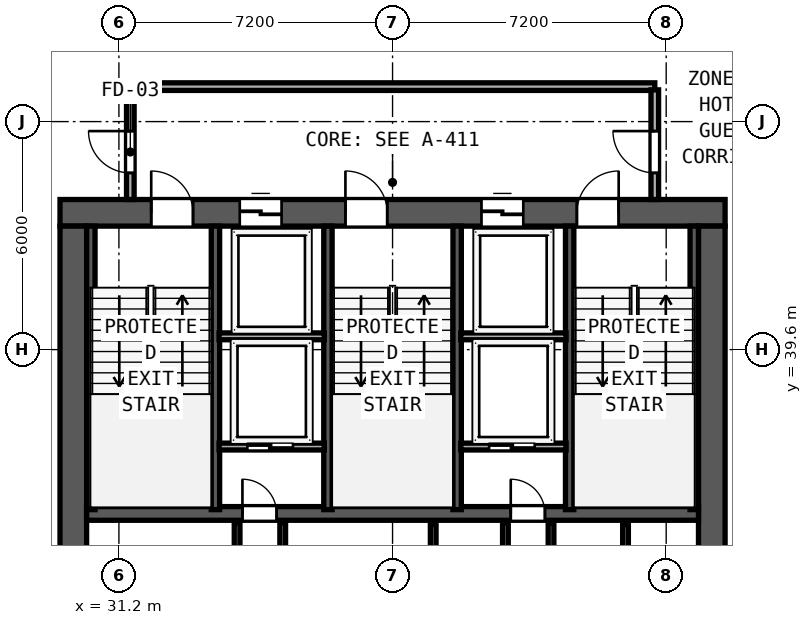
"""IFC4 building model, lengths in metres.
Left out: names, types, materials, properties, quantities, classifications, styles, units other than length and angle.
Written with IfcOpenShell. Run it as: python <this file> out.ifc"""

import sys

from ifc_helpers import new_model, si_unit, direction, frame, frame_2d, origin, place, context, subcontext, project, spatial, rectangle, extrude, element, fill, save


model = new_model("IFC4")
c1 = context("Model", 3, precision=1e-05, world=origin(), true_north=direction((0.0, 1.0)))
c2 = subcontext(c1, "Body", "Model", "MODEL_VIEW")
j1 = project(units=[si_unit("LENGTHUNIT", "METRE"), si_unit("PLANEANGLEUNIT", "RADIAN")], contexts=[c1])
p1 = place(None, origin())
s1 = spatial("IfcSite", under=j1, at=p1, CompositionType="ELEMENT")
p2 = place(p1, origin())
s2 = spatial("IfcBuilding", under=s1, at=p2, CompositionType="ELEMENT")
p3 = place(p2, frame((0.0, 0.0, 106.0)))
s3 = spatial("IfcBuildingStorey", under=s2, at=p3, CompositionType="ELEMENT", Elevation=106.0)
p4 = place(p3, frame((29.65, 43.2, 0.0), z_axis=(0.0, 0.0, 1.0), x_axis=(1.0, 0.0, 0.0)))
e1 = element("IfcWall", 1, at=p4, inside=s3, PredefinedType="SHEAR", context=c2, shape_type="SweptSolid", body=[
    extrude(rectangle(XDim=17.5, YDim=0.7, at=frame_2d((8.75, 0.0))), origin(), (0.0, 0.0, 1.0), 3.6),
])
p5 = place(p4, frame((2.4, 0.0, 0.0)))
e2 = element("IfcOpeningElement", 2, at=p5, cuts=e1, PredefinedType="OPENING", context=c2, shape_type="SweptSolid", body=[
    extrude(rectangle(XDim=1.1, YDim=2.15, at=frame_2d((0.55, 1.075))), frame((0.0, 0.36, 0.0), z_axis=(0.0, -1.0, 0.0), x_axis=(1.0, 0.0, 0.0)), (0.0, 0.0, 1.0), 0.72),
])
p6 = place(p4, frame((7.51, 0.0, 0.0)))
e3 = element("IfcOpeningElement", 3, at=p6, cuts=e1, PredefinedType="OPENING", context=c2, shape_type="SweptSolid", body=[
    extrude(rectangle(XDim=1.1, YDim=2.15, at=frame_2d((0.55, 1.075))), frame((0.0, 0.36, 0.0), z_axis=(0.0, -1.0, 0.0), x_axis=(1.0, 0.0, 0.0)), (0.0, 0.0, 1.0), 0.72),
])
p7 = place(p4, frame((13.6, 0.0, 0.0)))
e4 = element("IfcOpeningElement", 4, at=p7, cuts=e1, PredefinedType="OPENING", context=c2, shape_type="SweptSolid", body=[
    extrude(rectangle(XDim=1.1, YDim=2.15, at=frame_2d((0.55, 1.075))), frame((0.0, 0.36, 0.0), z_axis=(0.0, -1.0, 0.0), x_axis=(1.0, 0.0, 0.0)), (0.0, 0.0, 1.0), 0.72),
])
p8 = place(p4, frame((4.73, 0.0, 0.0)))
e5 = element("IfcOpeningElement", 5, at=p8, cuts=e1, PredefinedType="OPENING", context=c2, shape_type="SweptSolid", body=[
    extrude(rectangle(XDim=1.1, YDim=2.2, at=frame_2d((0.55, 1.1))), frame((0.0, 0.36, 0.0), z_axis=(0.0, -1.0, 0.0), x_axis=(1.0, 0.0, 0.0)), (0.0, 0.0, 1.0), 0.72),
])
p9 = place(p4, frame((11.09, 0.0, 0.0)))
e6 = element("IfcOpeningElement", 6, at=p9, cuts=e1, PredefinedType="OPENING", context=c2, shape_type="SweptSolid", body=[
    extrude(rectangle(XDim=1.1, YDim=2.2, at=frame_2d((0.55, 1.1))), frame((0.0, 0.36, 0.0), z_axis=(0.0, -1.0, 0.0), x_axis=(1.0, 0.0, 0.0)), (0.0, 0.0, 1.0), 0.72),
])
for number, where, z_axis, x_axis in (
    (7, (30.0, 32.8, 0.0), (0.0, 0.0, 1.0), (0.0, 1.0, 0.0)),
    (8, (46.8, 32.8, 0.0), (0.0, 0.0, 1.0), (0.0, 1.0, 0.0)),
):
    element("IfcWall", number, at=place(p3, frame(where, z_axis=z_axis, x_axis=x_axis)), inside=s3, PredefinedType="SHEAR", context=c2, shape_type="SweptSolid", body=[
        extrude(rectangle(XDim=10.05, YDim=0.7, at=frame_2d((5.025, 0.0))), origin(), (0.0, 0.0, 1.0), 3.6),
    ])
p10 = place(p3, frame((30.35, 35.29, 0.0), z_axis=(0.0, 0.0, 1.0), x_axis=(1.0, 0.0, 0.0)))
e9 = element("IfcWall", 9, at=p10, inside=s3, PredefinedType="SHEAR", context=c2, shape_type="SweptSolid", body=[
    extrude(rectangle(XDim=16.1, YDim=0.36, at=frame_2d((8.05, 0.0))), origin(), (0.0, 0.0, 1.0), 3.6),
])
p11 = place(p10, frame((5.0, 0.0, 0.0), z_axis=(0.0, 0.0, 1.0), x_axis=(-1.0, 0.0, 0.0)))
e10 = element("IfcOpeningElement", 10, at=p11, cuts=e9, PredefinedType="OPENING", context=c2, shape_type="SweptSolid", body=[
    extrude(rectangle(XDim=0.9, YDim=2.1, at=frame_2d((0.45, 1.05))), frame((0.0, 0.19, 0.0), z_axis=(0.0, -1.0, 0.0), x_axis=(1.0, 0.0, 0.0)), (0.0, 0.0, 1.0), 0.38),
])
p12 = place(p10, frame((12.06, 0.0, 0.0), z_axis=(0.0, 0.0, 1.0), x_axis=(-1.0, 0.0, 0.0)))
e11 = element("IfcOpeningElement", 11, at=p12, cuts=e9, PredefinedType="OPENING", context=c2, shape_type="SweptSolid", body=[
    extrude(rectangle(XDim=0.9, YDim=2.1, at=frame_2d((0.45, 1.05))), frame((0.0, 0.19, 0.0), z_axis=(0.0, -1.0, 0.0), x_axis=(1.0, 0.0, 0.0)), (0.0, 0.0, 1.0), 0.38),
])
for number, where, z_axis, x_axis in (
    (12, (30.462, 35.39, 0.0), (0.0, 0.0, 1.0), (0.0, 1.0, 0.0)),
    (13, (33.74, 35.39, 0.0), (0.0, 0.0, 1.0), (0.0, 1.0, 0.0)),
    (14, (36.7, 35.39, 0.0), (0.0, 0.0, 1.0), (0.0, 1.0, 0.0)),
    (15, (40.1, 35.39, 0.0), (0.0, 0.0, 1.0), (0.0, 1.0, 0.0)),
    (16, (43.06, 35.39, 0.0), (0.0, 0.0, 1.0), (0.0, 1.0, 0.0)),
    (17, (46.338, 35.39, 0.0), (0.0, 0.0, 1.0), (0.0, 1.0, 0.0)),
):
    element("IfcWall", number, at=place(p3, frame(where, z_axis=z_axis, x_axis=x_axis)), inside=s3, PredefinedType="SHEAR", context=c2, shape_type="SweptSolid", body=[
        extrude(rectangle(XDim=7.46, YDim=0.22, at=frame_2d((3.73, 0.0))), origin(), (0.0, 0.0, 1.0), 3.6),
    ])
p13 = place(p3, frame((31.5, 46.52, 0.0), z_axis=(0.0, 0.0, 1.0), x_axis=(1.0, 0.0, 0.0)))
e18 = element("IfcWall", 18, at=p13, inside=s3, PredefinedType="SOLIDWALL", context=c2, shape_type="SweptSolid", body=[
    extrude(rectangle(XDim=13.8, YDim=0.2, at=frame_2d((6.9, 0.0))), origin(), (0.0, 0.0, 1.0), 3.6),
])
p14 = place(p3, frame((31.5, 43.55, 0.0), z_axis=(0.0, 0.0, 1.0), x_axis=(0.0, 1.0, 0.0)))
e19 = element("IfcWall", 19, at=p14, inside=s3, PredefinedType="SOLIDWALL", context=c2, shape_type="SweptSolid", body=[
    extrude(rectangle(XDim=2.885, YDim=0.2, at=frame_2d((1.442, 0.0))), origin(), (0.0, 0.0, 1.0), 3.6),
])
p15 = place(p14, frame((1.8, 0.0, 0.0), z_axis=(0.0, 0.0, 1.0), x_axis=(-1.0, 0.0, 0.0)))
e20 = element("IfcOpeningElement", 20, at=p15, cuts=e19, PredefinedType="OPENING", context=c2, shape_type="SweptSolid", body=[
    extrude(rectangle(XDim=1.1, YDim=2.15, at=frame_2d((0.55, 1.075))), frame((0.0, 0.11, 0.0), z_axis=(0.0, -1.0, 0.0), x_axis=(1.0, 0.0, 0.0)), (0.0, 0.0, 1.0), 0.22),
])
p16 = place(p3, frame((45.3, 43.55, 0.0), z_axis=(0.0, 0.0, 1.0), x_axis=(0.0, 1.0, 0.0)))
e21 = element("IfcWall", 21, at=p16, inside=s3, PredefinedType="SOLIDWALL", context=c2, shape_type="SweptSolid", body=[
    extrude(rectangle(XDim=2.885, YDim=0.2, at=frame_2d((1.442, 0.0))), origin(), (0.0, 0.0, 1.0), 3.6),
])
p17 = place(p16, frame((0.7, 0.0, 0.0)))
e22 = element("IfcOpeningElement", 22, at=p17, cuts=e21, PredefinedType="OPENING", context=c2, shape_type="SweptSolid", body=[
    extrude(rectangle(XDim=1.1, YDim=2.15, at=frame_2d((0.55, 1.075))), frame((0.0, 0.11, 0.0), z_axis=(0.0, -1.0, 0.0), x_axis=(1.0, 0.0, 0.0)), (0.0, 0.0, 1.0), 0.22),
])
for number, where, z_axis, x_axis in (
    (23, (33.835, 39.95, 0.0), (0.0, 0.0, 1.0), (1.0, 0.0, 0.0)),
    (24, (40.195, 39.95, 0.0), (0.0, 0.0, 1.0), (1.0, 0.0, 0.0)),
):
    element("IfcWall", number, at=place(p3, frame(where, z_axis=z_axis, x_axis=x_axis)), inside=s3, PredefinedType="SOLIDWALL", context=c2, shape_type="SweptSolid", body=[
        extrude(rectangle(XDim=2.77, YDim=0.18, at=frame_2d((1.385, 0.0))), origin(), (0.0, 0.0, 1.0), 3.6),
    ])
p18 = place(p3, frame((33.835, 37.05, 0.0), z_axis=(0.0, 0.0, 1.0), x_axis=(1.0, 0.0, 0.0)))
e25 = element("IfcWall", 25, at=p18, inside=s3, PredefinedType="SOLIDWALL", context=c2, shape_type="SweptSolid", body=[
    extrude(rectangle(XDim=2.77, YDim=0.18, at=frame_2d((1.385, 0.0))), origin(), (0.0, 0.0, 1.0), 3.6),
])
p19 = place(p18, frame((1.945, 0.0, 0.0), z_axis=(0.0, 0.0, 1.0), x_axis=(-1.0, 0.0, 0.0)))
e26 = element("IfcOpeningElement", 26, at=p19, cuts=e25, PredefinedType="OPENING", context=c2, shape_type="SweptSolid", body=[
    extrude(rectangle(XDim=1.2, YDim=2.2, at=frame_2d((0.6, 1.1))), frame((0.0, 0.1, 0.0), z_axis=(0.0, -1.0, 0.0), x_axis=(1.0, 0.0, 0.0)), (0.0, 0.0, 1.0), 0.2),
])
for number, where, z_axis, x_axis in (
    (27, (34.31, 32.88, 0.0), (0.0, 0.0, 1.0), (0.0, 1.0, 0.0)),
    (28, (35.51, 32.88, 0.0), (0.0, 0.0, 1.0), (0.0, 1.0, 0.0)),
):
    element("IfcWall", number, at=place(p3, frame(where, z_axis=z_axis, x_axis=x_axis)), inside=s3, PredefinedType="SOLIDWALL", context=c2, shape_type="SweptSolid", body=[
        extrude(rectangle(XDim=2.17, YDim=0.15, at=frame_2d((1.085, 0.0))), origin(), (0.0, 0.0, 1.0), 3.6),
    ])
p20 = place(p3, frame((40.195, 37.05, 0.0), z_axis=(0.0, 0.0, 1.0), x_axis=(1.0, 0.0, 0.0)))
e29 = element("IfcWall", 29, at=p20, inside=s3, PredefinedType="SOLIDWALL", context=c2, shape_type="SweptSolid", body=[
    extrude(rectangle(XDim=2.77, YDim=0.18, at=frame_2d((1.385, 0.0))), origin(), (0.0, 0.0, 1.0), 3.6),
])
p21 = place(p20, frame((1.945, 0.0, 0.0), z_axis=(0.0, 0.0, 1.0), x_axis=(-1.0, 0.0, 0.0)))
e30 = element("IfcOpeningElement", 30, at=p21, cuts=e29, PredefinedType="OPENING", context=c2, shape_type="SweptSolid", body=[
    extrude(rectangle(XDim=1.2, YDim=2.2, at=frame_2d((0.6, 1.1))), frame((0.0, 0.1, 0.0), z_axis=(0.0, -1.0, 0.0), x_axis=(1.0, 0.0, 0.0)), (0.0, 0.0, 1.0), 0.2),
])
for number, where, z_axis, x_axis in (
    (31, (41.37, 32.88, 0.0), (0.0, 0.0, 1.0), (0.0, 1.0, 0.0)),
    (32, (42.57, 32.88, 0.0), (0.0, 0.0, 1.0), (0.0, 1.0, 0.0)),
):
    element("IfcWall", number, at=place(p3, frame(where, z_axis=z_axis, x_axis=x_axis)), inside=s3, PredefinedType="SOLIDWALL", context=c2, shape_type="SweptSolid", body=[
        extrude(rectangle(XDim=2.17, YDim=0.15, at=frame_2d((1.085, 0.0))), origin(), (0.0, 0.0, 1.0), 3.6),
    ])
for number, where, z_axis, x_axis in (
    (33, (39.47, 32.95, 0.0), (0.0, 0.0, 1.0), (0.0, 1.0, 0.0)),
    (34, (44.53, 32.95, 0.0), (0.0, 0.0, 1.0), (0.0, 1.0, 0.0)),
):
    element("IfcWall", number, at=place(p3, frame(where, z_axis=z_axis, x_axis=x_axis)), inside=s3, PredefinedType="SOLIDWALL", context=c2, shape_type="SweptSolid", body=[
        extrude(rectangle(XDim=2.05, YDim=0.15, at=frame_2d((1.025, 0.0))), origin(), (0.0, 0.0, 1.0), 3.6),
    ])
p22 = place(p5, origin())
e35 = element("IfcDoor", 35, at=p22, inside=s3, OperationType="SINGLE_SWING_LEFT", PredefinedType="DOOR", context=c2, shape_type="SweptSolid", body=[
    extrude(rectangle(XDim=1.1, YDim=2.15, at=frame_2d((0.55, 1.075))), frame((0.0, 0.185, 0.0), z_axis=(0.0, -1.0, 0.0), x_axis=(1.0, 0.0, 0.0)), (0.0, 0.0, 1.0), 0.05),
])
fill(e2, e35)
p23 = place(p6, origin())
e36 = element("IfcDoor", 36, at=p23, inside=s3, OperationType="SINGLE_SWING_LEFT", PredefinedType="DOOR", context=c2, shape_type="SweptSolid", body=[
    extrude(rectangle(XDim=1.1, YDim=2.15, at=frame_2d((0.55, 1.075))), frame((0.0, 0.185, 0.0), z_axis=(0.0, -1.0, 0.0), x_axis=(1.0, 0.0, 0.0)), (0.0, 0.0, 1.0), 0.05),
])
fill(e3, e36)
p24 = place(p7, origin())
e37 = element("IfcDoor", 37, at=p24, inside=s3, OperationType="SINGLE_SWING_RIGHT", PredefinedType="DOOR", context=c2, shape_type="SweptSolid", body=[
    extrude(rectangle(XDim=1.1, YDim=2.15, at=frame_2d((0.55, 1.075))), frame((0.0, 0.185, 0.0), z_axis=(0.0, -1.0, 0.0), x_axis=(1.0, 0.0, 0.0)), (0.0, 0.0, 1.0), 0.05),
])
fill(e4, e37)
p25 = place(p15, origin())
e38 = element("IfcDoor", 38, at=p25, inside=s3, OperationType="SINGLE_SWING_LEFT", PredefinedType="DOOR", context=c2, shape_type="SweptSolid", body=[
    extrude(rectangle(XDim=1.1, YDim=2.15, at=frame_2d((0.55, 1.075))), frame((0.0, 0.025, 0.0), z_axis=(0.0, -1.0, 0.0), x_axis=(1.0, 0.0, 0.0)), (0.0, 0.0, 1.0), 0.05),
])
fill(e20, e38)
p26 = place(p17, origin())
e39 = element("IfcDoor", 39, at=p26, inside=s3, OperationType="SINGLE_SWING_RIGHT", PredefinedType="DOOR", context=c2, shape_type="SweptSolid", body=[
    extrude(rectangle(XDim=1.1, YDim=2.15, at=frame_2d((0.55, 1.075))), frame((0.0, 0.025, 0.0), z_axis=(0.0, -1.0, 0.0), x_axis=(1.0, 0.0, 0.0)), (0.0, 0.0, 1.0), 0.05),
])
fill(e22, e39)
p27 = place(p8, origin())
e40 = element("IfcDoor", 40, at=p27, inside=s3, OperationType="SLIDING_TO_LEFT", PredefinedType="DOOR", context=c2, shape_type="SweptSolid", body=[
    extrude(rectangle(XDim=1.1, YDim=2.2, at=frame_2d((0.55, 1.1))), frame((0.0, 0.185, 0.0), z_axis=(0.0, -1.0, 0.0), x_axis=(1.0, 0.0, 0.0)), (0.0, 0.0, 1.0), 0.05),
])
fill(e5, e40)
p28 = place(p9, origin())
e41 = element("IfcDoor", 41, at=p28, inside=s3, OperationType="SLIDING_TO_LEFT", PredefinedType="DOOR", context=c2, shape_type="SweptSolid", body=[
    extrude(rectangle(XDim=1.1, YDim=2.2, at=frame_2d((0.55, 1.1))), frame((0.0, 0.185, 0.0), z_axis=(0.0, -1.0, 0.0), x_axis=(1.0, 0.0, 0.0)), (0.0, 0.0, 1.0), 0.05),
])
fill(e6, e41)
p29 = place(p19, origin())
e42 = element("IfcDoor", 42, at=p29, inside=s3, OperationType="SLIDING_TO_RIGHT", PredefinedType="DOOR", context=c2, shape_type="SweptSolid", body=[
    extrude(rectangle(XDim=1.2, YDim=2.2, at=frame_2d((0.6, 1.1))), frame((0.0, 0.025, 0.0), z_axis=(0.0, -1.0, 0.0), x_axis=(1.0, 0.0, 0.0)), (0.0, 0.0, 1.0), 0.05),
])
fill(e26, e42)
p30 = place(p11, origin())
e43 = element("IfcDoor", 43, at=p30, inside=s3, OperationType="SINGLE_SWING_RIGHT", PredefinedType="DOOR", context=c2, shape_type="SweptSolid", body=[
    extrude(rectangle(XDim=0.9, YDim=2.1, at=frame_2d((0.45, 1.05))), frame((0.0, 0.025, 0.0), z_axis=(0.0, -1.0, 0.0), x_axis=(1.0, 0.0, 0.0)), (0.0, 0.0, 1.0), 0.05),
])
fill(e10, e43)
p31 = place(p21, origin())
e44 = element("IfcDoor", 44, at=p31, inside=s3, OperationType="SLIDING_TO_RIGHT", PredefinedType="DOOR", context=c2, shape_type="SweptSolid", body=[
    extrude(rectangle(XDim=1.2, YDim=2.2, at=frame_2d((0.6, 1.1))), frame((0.0, 0.025, 0.0), z_axis=(0.0, -1.0, 0.0), x_axis=(1.0, 0.0, 0.0)), (0.0, 0.0, 1.0), 0.05),
])
fill(e30, e44)
p32 = place(p12, origin())
e45 = element("IfcDoor", 45, at=p32, inside=s3, OperationType="SINGLE_SWING_RIGHT", PredefinedType="DOOR", context=c2, shape_type="SweptSolid", body=[
    extrude(rectangle(XDim=0.9, YDim=2.1, at=frame_2d((0.45, 1.05))), frame((0.0, 0.025, 0.0), z_axis=(0.0, -1.0, 0.0), x_axis=(1.0, 0.0, 0.0)), (0.0, 0.0, 1.0), 0.05),
])
fill(e11, e45)
save(model, sys.argv[1])
